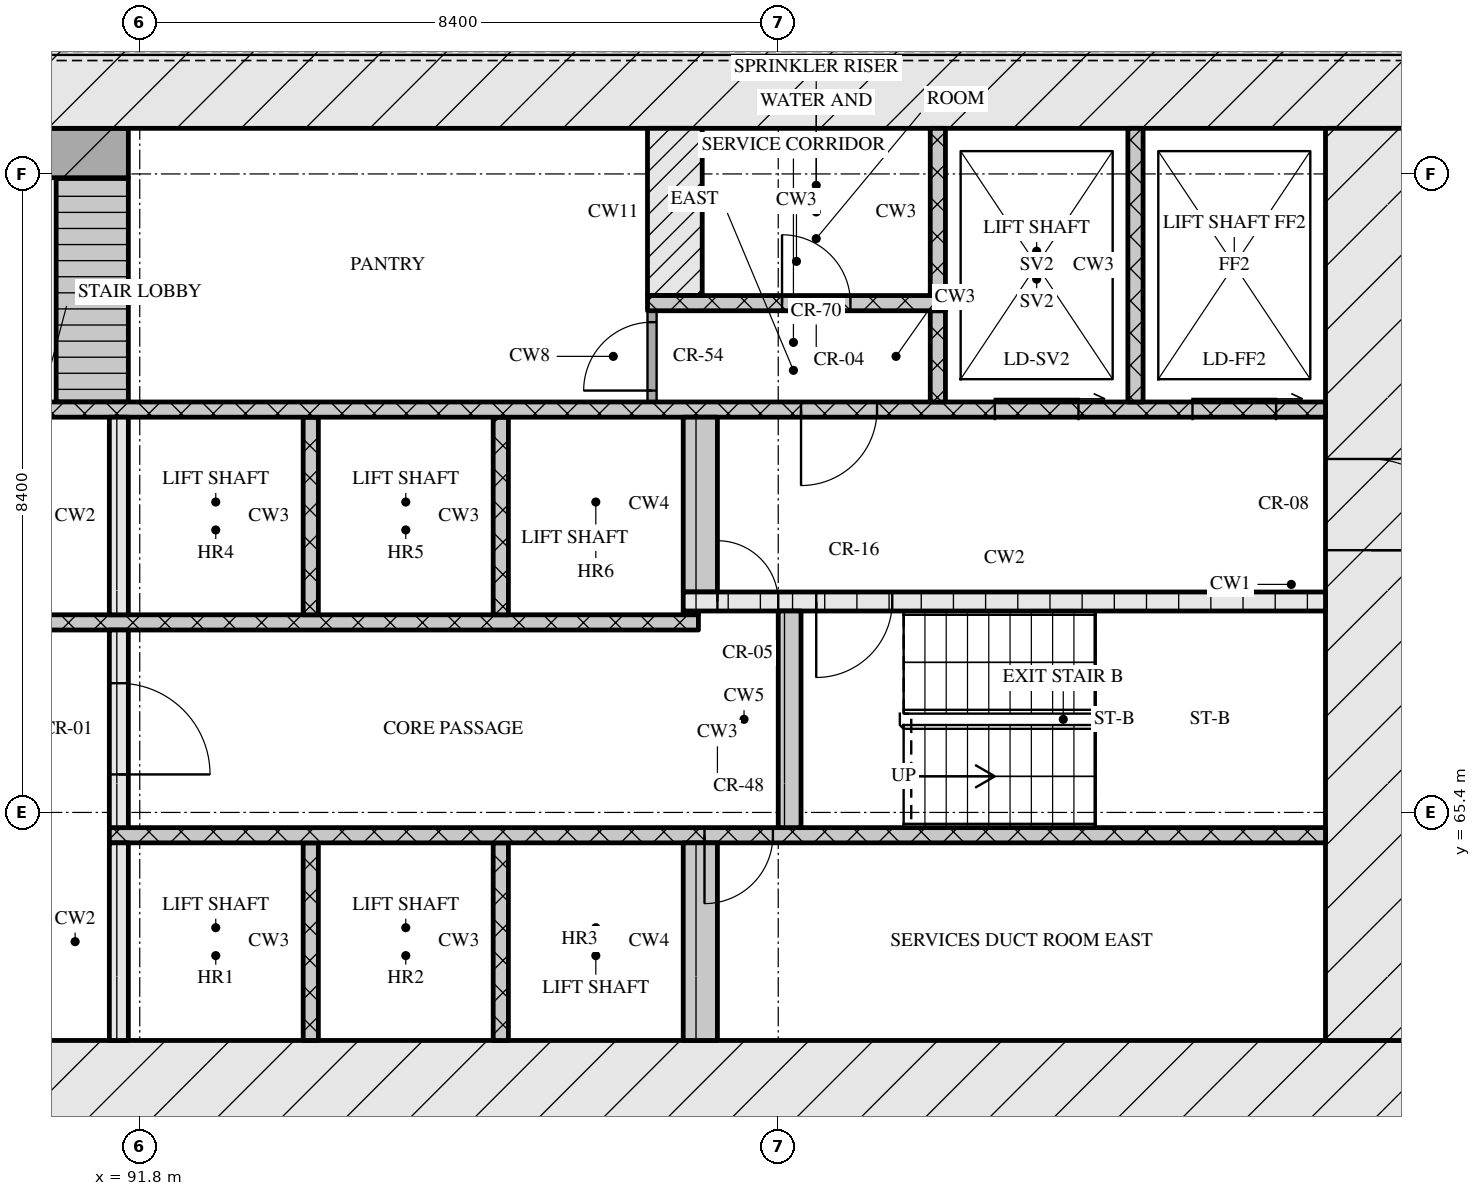
"""IFC4 building model, lengths in metres.
Left out: names, types, materials, properties, quantities, classifications, styles, units other than length and angle.
Written with IfcOpenShell. Run it as: python <this file> out.ifc"""

import sys

from ifc_helpers import new_model, si_unit, direction, frame, frame_2d, origin, place, context, subcontext, project, spatial, rectangle, extrude, element, fill, save


model = new_model("IFC4")
c1 = context("Model", 3, precision=1e-05, world=origin(), true_north=direction((0.0, 1.0)))
c2 = subcontext(c1, "Body", "Model", "MODEL_VIEW")
j1 = project(units=[si_unit("LENGTHUNIT", "METRE"), si_unit("PLANEANGLEUNIT", "RADIAN")], contexts=[c1])
p1 = place(None, origin())
s1 = spatial("IfcSite", under=j1, at=p1, CompositionType="ELEMENT")
p2 = place(p1, origin())
s2 = spatial("IfcBuilding", under=s1, at=p2, CompositionType="ELEMENT")
p3 = place(p2, frame((0.0, 0.0, 73.2)))
s3 = spatial("IfcBuildingStorey", under=s2, at=p3, CompositionType="ELEMENT", Elevation=73.2)
p4 = place(p3, frame((66.6, 61.8, 0.0), z_axis=(0.0, 0.0, 1.0), x_axis=(1.0, 0.0, 0.0)))
e1 = element("IfcWall", 1, at=p4, inside=s3, PredefinedType="SOLIDWALL", context=c2, shape_type="SweptSolid", body=[
    extrude(rectangle(XDim=42.0, YDim=1.2, at=frame_2d((21.0, 0.0))), origin(), (0.0, 0.0, 1.0), 3.32),
])
p5 = place(p4, frame((21.35, 0.0, 0.0)))
e2 = element("IfcOpeningElement", 2, at=p5, cuts=e1, PredefinedType="OPENING", context=c2, shape_type="SweptSolid", body=[
    extrude(rectangle(XDim=1.8, YDim=2.1, at=frame_2d((0.9, 1.05))), frame((0.0, 0.61, 0.0), z_axis=(0.0, -1.0, 0.0), x_axis=(1.0, 0.0, 0.0)), (0.0, 0.0, 1.0), 1.22),
])
p6 = place(p3, frame((66.6, 75.0, 0.0), z_axis=(0.0, 0.0, 1.0), x_axis=(1.0, 0.0, 0.0)))
e3 = element("IfcWall", 3, at=p6, inside=s3, PredefinedType="SOLIDWALL", context=c2, shape_type="SweptSolid", body=[
    extrude(rectangle(XDim=42.0, YDim=1.2, at=frame_2d((21.0, 0.0))), origin(), (0.0, 0.0, 1.0), 3.32),
])
p7 = place(p3, frame((108.0, 62.4, 0.0), z_axis=(0.0, 0.0, 1.0), x_axis=(0.0, 1.0, 0.0)))
e4 = element("IfcWall", 4, at=p7, inside=s3, PredefinedType="SOLIDWALL", context=c2, shape_type="SweptSolid", body=[
    extrude(rectangle(XDim=12.0, YDim=1.2, at=frame_2d((6.0, 0.0))), origin(), (0.0, 0.0, 1.0), 3.32),
])
p8 = place(p7, frame((6.45, 0.0, 0.0)))
e5 = element("IfcOpeningElement", 5, at=p8, cuts=e4, PredefinedType="OPENING", context=c2, shape_type="SweptSolid", body=[
    extrude(rectangle(XDim=1.2, YDim=2.1, at=frame_2d((0.6, 1.05))), frame((0.0, 0.61, 0.0), z_axis=(0.0, -1.0, 0.0), x_axis=(1.0, 0.0, 0.0)), (0.0, 0.0, 1.0), 1.22),
])
p9 = place(p3, frame((91.525, 62.4, 0.0), z_axis=(0.0, 0.0, 1.0), x_axis=(0.0, 1.0, 0.0)))
e6 = element("IfcWall", 6, at=p9, inside=s3, PredefinedType="SOLIDWALL", context=c2, shape_type="SweptSolid", body=[
    extrude(rectangle(XDim=2.6, YDim=0.25, at=frame_2d((1.3, 0.0))), origin(), (0.0, 0.0, 1.0), 3.32),
])
for number, where, z_axis, x_axis in (
    (7, (94.05, 62.4, 0.0), (0.0, 0.0, 1.0), (0.0, 1.0, 0.0)),
    (8, (96.55, 62.4, 0.0), (0.0, 0.0, 1.0), (0.0, 1.0, 0.0)),
):
    element("IfcWall", number, at=place(p3, frame(where, z_axis=z_axis, x_axis=x_axis)), inside=s3, PredefinedType="SOLIDWALL", context=c2, shape_type="SweptSolid", body=[
        extrude(rectangle(XDim=2.6, YDim=0.2, at=frame_2d((1.3, 0.0))), origin(), (0.0, 0.0, 1.0), 3.32),
    ])
p10 = place(p3, frame((99.175, 62.4, 0.0), z_axis=(0.0, 0.0, 1.0), x_axis=(0.0, 1.0, 0.0)))
e9 = element("IfcWall", 9, at=p10, inside=s3, PredefinedType="SOLIDWALL", context=c2, shape_type="SweptSolid", body=[
    extrude(rectangle(XDim=2.6, YDim=0.45, at=frame_2d((1.3, 0.0))), origin(), (0.0, 0.0, 1.0), 3.32),
])
p11 = place(p3, frame((91.4, 65.1, 0.0), z_axis=(0.0, 0.0, 1.0), x_axis=(1.0, 0.0, 0.0)))
e10 = element("IfcWall", 10, at=p11, inside=s3, PredefinedType="SOLIDWALL", context=c2, shape_type="SweptSolid", body=[
    extrude(rectangle(XDim=16.0, YDim=0.2, at=frame_2d((8.0, 0.0))), origin(), (0.0, 0.0, 1.0), 3.32),
])
p12 = place(p11, frame((7.83, 0.0, 0.0)))
e11 = element("IfcOpeningElement", 11, at=p12, cuts=e10, PredefinedType="OPENING", context=c2, shape_type="SweptSolid", body=[
    extrude(rectangle(XDim=0.9, YDim=2.1, at=frame_2d((0.45, 1.05))), frame((0.0, 0.11, 0.0), z_axis=(0.0, -1.0, 0.0), x_axis=(1.0, 0.0, 0.0)), (0.0, 0.0, 1.0), 0.22),
])
p13 = place(p3, frame((91.525, 65.2, 0.0), z_axis=(0.0, 0.0, 1.0), x_axis=(0.0, 1.0, 0.0)))
e12 = element("IfcWall", 12, at=p13, inside=s3, PredefinedType="SOLIDWALL", context=c2, shape_type="SweptSolid", body=[
    extrude(rectangle(XDim=2.6, YDim=0.25, at=frame_2d((1.3, 0.0))), origin(), (0.0, 0.0, 1.0), 3.32),
])
p14 = place(p13, frame((0.7, 0.0, 0.0)))
e13 = element("IfcOpeningElement", 13, at=p14, cuts=e12, PredefinedType="OPENING", context=c2, shape_type="SweptSolid", body=[
    extrude(rectangle(XDim=1.2, YDim=2.1, at=frame_2d((0.6, 1.05))), frame((0.0, 0.135, 0.0), z_axis=(0.0, -1.0, 0.0), x_axis=(1.0, 0.0, 0.0)), (0.0, 0.0, 1.0), 0.27),
])
p15 = place(p3, frame((100.35, 65.2, 0.0), z_axis=(0.0, 0.0, 1.0), x_axis=(0.0, 1.0, 0.0)))
e14 = element("IfcWall", 14, at=p15, inside=s3, PredefinedType="SOLIDWALL", context=c2, shape_type="SweptSolid", body=[
    extrude(rectangle(XDim=2.85, YDim=0.3, at=frame_2d((1.425, 0.0))), origin(), (0.0, 0.0, 1.0), 3.32),
])
p16 = place(p3, frame((76.05, 67.9, 0.0), z_axis=(0.0, 0.0, 1.0), x_axis=(1.0, 0.0, 0.0)))
e15 = element("IfcWall", 15, at=p16, inside=s3, PredefinedType="SOLIDWALL", context=c2, shape_type="SweptSolid", body=[
    extrude(rectangle(XDim=23.1, YDim=0.2, at=frame_2d((11.55, 0.0))), origin(), (0.0, 0.0, 1.0), 3.32),
])
p17 = place(p16, frame((0.6, 0.0, 0.0)))
e16 = element("IfcOpeningElement", 16, at=p17, cuts=e15, PredefinedType="OPENING", context=c2, shape_type="SweptSolid", body=[
    extrude(rectangle(XDim=1.1, YDim=2.1, at=frame_2d((0.55, 1.05))), frame((0.0, 0.11, 0.0), z_axis=(0.0, -1.0, 0.0), x_axis=(1.0, 0.0, 0.0)), (0.0, 0.0, 1.0), 0.22),
])
p18 = place(p16, frame((3.1, 0.0, 0.0)))
e17 = element("IfcOpeningElement", 17, at=p18, cuts=e15, PredefinedType="OPENING", context=c2, shape_type="SweptSolid", body=[
    extrude(rectangle(XDim=1.1, YDim=2.1, at=frame_2d((0.55, 1.05))), frame((0.0, 0.11, 0.0), z_axis=(0.0, -1.0, 0.0), x_axis=(1.0, 0.0, 0.0)), (0.0, 0.0, 1.0), 0.22),
])
p19 = place(p16, frame((5.6, 0.0, 0.0)))
e18 = element("IfcOpeningElement", 18, at=p19, cuts=e15, PredefinedType="OPENING", context=c2, shape_type="SweptSolid", body=[
    extrude(rectangle(XDim=1.1, YDim=2.1, at=frame_2d((0.55, 1.05))), frame((0.0, 0.11, 0.0), z_axis=(0.0, -1.0, 0.0), x_axis=(1.0, 0.0, 0.0)), (0.0, 0.0, 1.0), 0.22),
])
p20 = place(p16, frame((8.45, 0.0, 0.0)))
e19 = element("IfcOpeningElement", 19, at=p20, cuts=e15, PredefinedType="OPENING", context=c2, shape_type="SweptSolid", body=[
    extrude(rectangle(XDim=0.9, YDim=2.1, at=frame_2d((0.45, 1.05))), frame((0.0, 0.11, 0.0), z_axis=(0.0, -1.0, 0.0), x_axis=(1.0, 0.0, 0.0)), (0.0, 0.0, 1.0), 0.22),
])
p21 = place(p16, frame((10.91, 0.0, 0.0)))
e20 = element("IfcOpeningElement", 20, at=p21, cuts=e15, PredefinedType="OPENING", context=c2, shape_type="SweptSolid", body=[
    extrude(rectangle(XDim=0.9, YDim=2.1, at=frame_2d((0.45, 1.05))), frame((0.0, 0.11, 0.0), z_axis=(0.0, -1.0, 0.0), x_axis=(1.0, 0.0, 0.0)), (0.0, 0.0, 1.0), 0.22),
])
p22 = place(p16, frame((13.55, 0.0, 0.0)))
e21 = element("IfcOpeningElement", 21, at=p22, cuts=e15, PredefinedType="OPENING", context=c2, shape_type="SweptSolid", body=[
    extrude(rectangle(XDim=1.0, YDim=2.1, at=frame_2d((0.5, 1.05))), frame((0.0, 0.11, 0.0), z_axis=(0.0, -1.0, 0.0), x_axis=(1.0, 0.0, 0.0)), (0.0, 0.0, 1.0), 0.22),
])
p23 = place(p3, frame((91.525, 68.0, 0.0), z_axis=(0.0, 0.0, 1.0), x_axis=(0.0, 1.0, 0.0)))
e22 = element("IfcWall", 22, at=p23, inside=s3, PredefinedType="SOLIDWALL", context=c2, shape_type="SweptSolid", body=[
    extrude(rectangle(XDim=2.6, YDim=0.25, at=frame_2d((1.3, 0.0))), origin(), (0.0, 0.0, 1.0), 3.32),
])
for number, where, z_axis, x_axis in (
    (23, (94.05, 68.0, 0.0), (0.0, 0.0, 1.0), (0.0, 1.0, 0.0)),
    (24, (96.55, 68.0, 0.0), (0.0, 0.0, 1.0), (0.0, 1.0, 0.0)),
):
    element("IfcWall", number, at=place(p3, frame(where, z_axis=z_axis, x_axis=x_axis)), inside=s3, PredefinedType="SOLIDWALL", context=c2, shape_type="SweptSolid", body=[
        extrude(rectangle(XDim=2.6, YDim=0.2, at=frame_2d((1.3, 0.0))), origin(), (0.0, 0.0, 1.0), 3.32),
    ])
p24 = place(p3, frame((98.95, 68.025, 0.0), z_axis=(0.0, 0.0, 1.0), x_axis=(1.0, 0.0, 0.0)))
e25 = element("IfcWall", 25, at=p24, inside=s3, PredefinedType="SOLIDWALL", context=c2, shape_type="SweptSolid", body=[
    extrude(rectangle(XDim=0.2, YDim=0.05, at=frame_2d((0.1, 0.0))), origin(), (0.0, 0.0, 1.0), 3.32),
])
p25 = place(p3, frame((98.95, 68.175, 0.0), z_axis=(0.0, 0.0, 1.0), x_axis=(1.0, 0.0, 0.0)))
e26 = element("IfcWall", 26, at=p25, inside=s3, PredefinedType="SOLIDWALL", context=c2, shape_type="SweptSolid", body=[
    extrude(rectangle(XDim=8.45, YDim=0.25, at=frame_2d((4.225, 0.0))), origin(), (0.0, 0.0, 1.0), 3.32),
])
p26 = place(p25, frame((0.45, 0.0, 0.0)))
e27 = element("IfcOpeningElement", 27, at=p26, cuts=e26, PredefinedType="OPENING", context=c2, shape_type="SweptSolid", body=[
    extrude(rectangle(XDim=0.8, YDim=2.1, at=frame_2d((0.4, 1.05))), frame((0.0, 0.135, 0.0), z_axis=(0.0, -1.0, 0.0), x_axis=(1.0, 0.0, 0.0)), (0.0, 0.0, 1.0), 0.27),
])
p27 = place(p25, frame((1.75, 0.0, 0.0)))
e28 = element("IfcOpeningElement", 28, at=p27, cuts=e26, PredefinedType="OPENING", context=c2, shape_type="SweptSolid", body=[
    extrude(rectangle(XDim=1.0, YDim=2.1, at=frame_2d((0.5, 1.05))), frame((0.0, 0.135, 0.0), z_axis=(0.0, -1.0, 0.0), x_axis=(1.0, 0.0, 0.0)), (0.0, 0.0, 1.0), 0.27),
])
p28 = place(p3, frame((99.175, 68.3, 0.0), z_axis=(0.0, 0.0, 1.0), x_axis=(0.0, 1.0, 0.0)))
e29 = element("IfcWall", 29, at=p28, inside=s3, PredefinedType="SOLIDWALL", context=c2, shape_type="SweptSolid", body=[
    extrude(rectangle(XDim=2.3, YDim=0.45, at=frame_2d((1.15, 0.0))), origin(), (0.0, 0.0, 1.0), 3.32),
])
p29 = place(p3, frame((67.8, 70.7, 0.0), z_axis=(0.0, 0.0, 1.0), x_axis=(1.0, 0.0, 0.0)))
e30 = element("IfcWall", 30, at=p29, inside=s3, PredefinedType="SOLIDWALL", context=c2, shape_type="SweptSolid", body=[
    extrude(rectangle(XDim=39.6, YDim=0.2, at=frame_2d((19.8, 0.0))), origin(), (0.0, 0.0, 1.0), 3.32),
])
p30 = place(p29, frame((0.65, 0.0, 0.0)))
e31 = element("IfcOpeningElement", 31, at=p30, cuts=e30, PredefinedType="OPENING", context=c2, shape_type="SweptSolid", body=[
    extrude(rectangle(XDim=1.1, YDim=2.1, at=frame_2d((0.55, 1.05))), frame((0.0, 0.11, 0.0), z_axis=(0.0, -1.0, 0.0), x_axis=(1.0, 0.0, 0.0)), (0.0, 0.0, 1.0), 0.22),
])
p31 = place(p29, frame((3.25, 0.0, 0.0)))
e32 = element("IfcOpeningElement", 32, at=p31, cuts=e30, PredefinedType="OPENING", context=c2, shape_type="SweptSolid", body=[
    extrude(rectangle(XDim=1.1, YDim=2.1, at=frame_2d((0.55, 1.05))), frame((0.0, 0.11, 0.0), z_axis=(0.0, -1.0, 0.0), x_axis=(1.0, 0.0, 0.0)), (0.0, 0.0, 1.0), 0.22),
])
p32 = place(p29, frame((5.9, 0.0, 0.0)))
e33 = element("IfcOpeningElement", 33, at=p32, cuts=e30, PredefinedType="OPENING", context=c2, shape_type="SweptSolid", body=[
    extrude(rectangle(XDim=1.0, YDim=2.1, at=frame_2d((0.5, 1.05))), frame((0.0, 0.11, 0.0), z_axis=(0.0, -1.0, 0.0), x_axis=(1.0, 0.0, 0.0)), (0.0, 0.0, 1.0), 0.22),
])
p33 = place(p29, frame((21.7, 0.0, 0.0)))
e34 = element("IfcOpeningElement", 34, at=p33, cuts=e30, PredefinedType="OPENING", context=c2, shape_type="SweptSolid", body=[
    extrude(rectangle(XDim=1.0, YDim=2.1, at=frame_2d((0.5, 1.05))), frame((0.0, 0.11, 0.0), z_axis=(0.0, -1.0, 0.0), x_axis=(1.0, 0.0, 0.0)), (0.0, 0.0, 1.0), 0.22),
])
p34 = place(p29, frame((32.7, 0.0, 0.0)))
e35 = element("IfcOpeningElement", 35, at=p34, cuts=e30, PredefinedType="OPENING", context=c2, shape_type="SweptSolid", body=[
    extrude(rectangle(XDim=1.0, YDim=2.1, at=frame_2d((0.5, 1.05))), frame((0.0, 0.11, 0.0), z_axis=(0.0, -1.0, 0.0), x_axis=(1.0, 0.0, 0.0)), (0.0, 0.0, 1.0), 0.22),
])
p35 = place(p29, frame((35.25, 0.0, 0.0)))
e36 = element("IfcOpeningElement", 36, at=p35, cuts=e30, PredefinedType="OPENING", context=c2, shape_type="SweptSolid", body=[
    extrude(rectangle(XDim=1.1, YDim=2.1, at=frame_2d((0.55, 1.05))), frame((0.0, 0.11, 0.0), z_axis=(0.0, -1.0, 0.0), x_axis=(1.0, 0.0, 0.0)), (0.0, 0.0, 1.0), 0.22),
])
p36 = place(p29, frame((37.85, 0.0, 0.0)))
e37 = element("IfcOpeningElement", 37, at=p36, cuts=e30, PredefinedType="OPENING", context=c2, shape_type="SweptSolid", body=[
    extrude(rectangle(XDim=1.1, YDim=2.1, at=frame_2d((0.55, 1.05))), frame((0.0, 0.11, 0.0), z_axis=(0.0, -1.0, 0.0), x_axis=(1.0, 0.0, 0.0)), (0.0, 0.0, 1.0), 0.22),
])
p37 = place(p3, frame((91.175, 70.8, 0.0), z_axis=(0.0, 0.0, 1.0), x_axis=(0.0, 1.0, 0.0)))
e38 = element("IfcWall", 38, at=p37, inside=s3, PredefinedType="SOLIDWALL", context=c2, shape_type="SweptSolid", body=[
    extrude(rectangle(XDim=2.95, YDim=0.95, at=frame_2d((1.475, 0.0))), origin(), (0.0, 0.0, 1.0), 3.32),
])
p38 = place(p3, frame((98.54, 70.8, 0.0), z_axis=(0.0, 0.0, 1.0), x_axis=(0.0, 1.0, 0.0)))
e39 = element("IfcWall", 39, at=p38, inside=s3, PredefinedType="PARTITIONING", context=c2, shape_type="SweptSolid", body=[
    extrude(rectangle(XDim=1.2, YDim=0.12, at=frame_2d((0.6, 0.0))), origin(), (0.0, 0.0, 1.0), 3.32),
])
p39 = place(p38, frame((0.15, 0.0, 0.0)))
e40 = element("IfcOpeningElement", 40, at=p39, cuts=e39, PredefinedType="OPENING", context=c2, shape_type="SweptSolid", body=[
    extrude(rectangle(XDim=0.9, YDim=2.1, at=frame_2d((0.45, 1.05))), frame((0.0, 0.07, 0.0), z_axis=(0.0, -1.0, 0.0), x_axis=(1.0, 0.0, 0.0)), (0.0, 0.0, 1.0), 0.14),
])
p40 = place(p3, frame((102.3, 70.8, 0.0), z_axis=(0.0, 0.0, 1.0), x_axis=(0.0, 1.0, 0.0)))
e41 = element("IfcWall", 41, at=p40, inside=s3, PredefinedType="SOLIDWALL", context=c2, shape_type="SweptSolid", body=[
    extrude(rectangle(XDim=1.2, YDim=0.2, at=frame_2d((0.6, 0.0))), origin(), (0.0, 0.0, 1.0), 3.32),
])
p41 = place(p3, frame((104.9, 70.8, 0.0), z_axis=(0.0, 0.0, 1.0), x_axis=(0.0, 1.0, 0.0)))
e42 = element("IfcWall", 42, at=p41, inside=s3, PredefinedType="SOLIDWALL", context=c2, shape_type="SweptSolid", body=[
    extrude(rectangle(XDim=3.6, YDim=0.2, at=frame_2d((1.8, 0.0))), origin(), (0.0, 0.0, 1.0), 3.32),
])
p42 = place(p3, frame((98.48, 72.1, 0.0), z_axis=(0.0, 0.0, 1.0), x_axis=(1.0, 0.0, 0.0)))
e43 = element("IfcWall", 43, at=p42, inside=s3, PredefinedType="SOLIDWALL", context=c2, shape_type="SweptSolid", body=[
    extrude(rectangle(XDim=3.92, YDim=0.2, at=frame_2d((1.96, 0.0))), origin(), (0.0, 0.0, 1.0), 3.32),
])
p43 = place(p42, frame((1.77, 0.0, 0.0)))
e44 = element("IfcOpeningElement", 44, at=p43, cuts=e43, PredefinedType="OPENING", context=c2, shape_type="SweptSolid", body=[
    extrude(rectangle(XDim=0.9, YDim=2.1, at=frame_2d((0.45, 1.05))), frame((0.0, 0.11, 0.0), z_axis=(0.0, -1.0, 0.0), x_axis=(1.0, 0.0, 0.0)), (0.0, 0.0, 1.0), 0.22),
])
p44 = place(p3, frame((98.84, 72.2, 0.0), z_axis=(0.0, 0.0, 1.0), x_axis=(0.0, 1.0, 0.0)))
e45 = element("IfcWall", 45, at=p44, inside=s3, PredefinedType="SOLIDWALL", context=c2, shape_type="SweptSolid", body=[
    extrude(rectangle(XDim=2.2, YDim=0.72, at=frame_2d((1.1, 0.0))), origin(), (0.0, 0.0, 1.0), 3.32),
])
p45 = place(p3, frame((102.3, 72.2, 0.0), z_axis=(0.0, 0.0, 1.0), x_axis=(0.0, 1.0, 0.0)))
e46 = element("IfcWall", 46, at=p45, inside=s3, PredefinedType="SOLIDWALL", context=c2, shape_type="SweptSolid", body=[
    extrude(rectangle(XDim=2.2, YDim=0.2, at=frame_2d((1.1, 0.0))), origin(), (0.0, 0.0, 1.0), 3.32),
])
p46 = place(p3, frame((83.55, 74.075, 0.0), z_axis=(0.0, 0.0, 1.0), x_axis=(1.0, 0.0, 0.0)))
e47 = element("IfcWall", 47, at=p46, inside=s3, PredefinedType="SOLIDWALL", context=c2, shape_type="SweptSolid", body=[
    extrude(rectangle(XDim=8.1, YDim=0.65, at=frame_2d((4.05, 0.0))), origin(), (0.0, 0.0, 1.0), 3.32),
])
p47 = place(p12, origin())
e48 = element("IfcDoor", 48, at=p47, inside=s3, OperationType="SINGLE_SWING_RIGHT", PredefinedType="DOOR", context=c2, shape_type="SweptSolid", body=[
    extrude(rectangle(XDim=0.9, YDim=2.1, at=frame_2d((0.45, 1.05))), frame((0.0, 0.025, 0.0), z_axis=(0.0, -1.0, 0.0), x_axis=(1.0, 0.0, 0.0)), (0.0, 0.0, 1.0), 0.05),
])
fill(e11, e48)
p48 = place(p14, origin())
e49 = element("IfcDoor", 49, at=p48, inside=s3, OperationType="SINGLE_SWING_RIGHT", PredefinedType="DOOR", context=c2, shape_type="SweptSolid", body=[
    extrude(rectangle(XDim=1.2, YDim=2.1, at=frame_2d((0.6, 1.05))), frame((0.0, 0.025, 0.0), z_axis=(0.0, -1.0, 0.0), x_axis=(1.0, 0.0, 0.0)), (0.0, 0.0, 1.0), 0.05),
])
fill(e13, e49)
p49 = place(p26, origin())
e50 = element("IfcDoor", 50, at=p49, inside=s3, OperationType="SINGLE_SWING_LEFT", PredefinedType="DOOR", context=c2, shape_type="SweptSolid", body=[
    extrude(rectangle(XDim=0.8, YDim=2.1, at=frame_2d((0.4, 1.05))), frame((0.0, 0.025, 0.0), z_axis=(0.0, -1.0, 0.0), x_axis=(1.0, 0.0, 0.0)), (0.0, 0.0, 1.0), 0.05),
])
fill(e27, e50)
p50 = place(p27, origin())
e51 = element("IfcDoor", 51, at=p50, inside=s3, OperationType="SINGLE_SWING_RIGHT", PredefinedType="DOOR", context=c2, shape_type="SweptSolid", body=[
    extrude(rectangle(XDim=1.0, YDim=2.1, at=frame_2d((0.5, 1.05))), frame((0.0, 0.025, 0.0), z_axis=(0.0, -1.0, 0.0), x_axis=(1.0, 0.0, 0.0)), (0.0, 0.0, 1.0), 0.05),
])
fill(e28, e51)
p51 = place(p8, origin())
e52 = element("IfcDoor", 52, at=p51, inside=s3, OperationType="SINGLE_SWING_RIGHT", PredefinedType="DOOR", context=c2, shape_type="SweptSolid", body=[
    extrude(rectangle(XDim=1.2, YDim=2.1, at=frame_2d((0.6, 1.05))), frame((0.0, 0.025, 0.0), z_axis=(0.0, -1.0, 0.0), x_axis=(1.0, 0.0, 0.0)), (0.0, 0.0, 1.0), 0.05),
])
fill(e5, e52)
p52 = place(p34, origin())
e53 = element("IfcDoor", 53, at=p52, inside=s3, OperationType="SINGLE_SWING_RIGHT", PredefinedType="DOOR", context=c2, shape_type="SweptSolid", body=[
    extrude(rectangle(XDim=1.0, YDim=2.1, at=frame_2d((0.5, 1.05))), frame((0.0, 0.025, 0.0), z_axis=(0.0, -1.0, 0.0), x_axis=(1.0, 0.0, 0.0)), (0.0, 0.0, 1.0), 0.05),
])
fill(e35, e53)
p53 = place(p35, origin())
e54 = element("IfcDoor", 54, at=p53, inside=s3, OperationType="SLIDING_TO_RIGHT", PredefinedType="DOOR", context=c2, shape_type="SweptSolid", body=[
    extrude(rectangle(XDim=1.1, YDim=2.1, at=frame_2d((0.55, 1.05))), frame((0.0, 0.025, 0.0), z_axis=(0.0, -1.0, 0.0), x_axis=(1.0, 0.0, 0.0)), (0.0, 0.0, 1.0), 0.05),
])
fill(e36, e54)
p54 = place(p36, origin())
e55 = element("IfcDoor", 55, at=p54, inside=s3, OperationType="SLIDING_TO_RIGHT", PredefinedType="DOOR", context=c2, shape_type="SweptSolid", body=[
    extrude(rectangle(XDim=1.1, YDim=2.1, at=frame_2d((0.55, 1.05))), frame((0.0, 0.025, 0.0), z_axis=(0.0, -1.0, 0.0), x_axis=(1.0, 0.0, 0.0)), (0.0, 0.0, 1.0), 0.05),
])
fill(e37, e55)
p55 = place(p39, origin())
e56 = element("IfcDoor", 56, at=p55, inside=s3, OperationType="SINGLE_SWING_LEFT", PredefinedType="DOOR", context=c2, shape_type="SweptSolid", body=[
    extrude(rectangle(XDim=0.9, YDim=2.1, at=frame_2d((0.45, 1.05))), frame((0.0, 0.025, 0.0), z_axis=(0.0, -1.0, 0.0), x_axis=(1.0, 0.0, 0.0)), (0.0, 0.0, 1.0), 0.05),
])
fill(e40, e56)
p56 = place(p43, origin())
e57 = element("IfcDoor", 57, at=p56, inside=s3, OperationType="SINGLE_SWING_LEFT", PredefinedType="DOOR", context=c2, shape_type="SweptSolid", body=[
    extrude(rectangle(XDim=0.9, YDim=2.1, at=frame_2d((0.45, 1.05))), frame((0.0, 0.025, 0.0), z_axis=(0.0, -1.0, 0.0), x_axis=(1.0, 0.0, 0.0)), (0.0, 0.0, 1.0), 0.05),
])
fill(e44, e57)
save(model, sys.argv[1])
